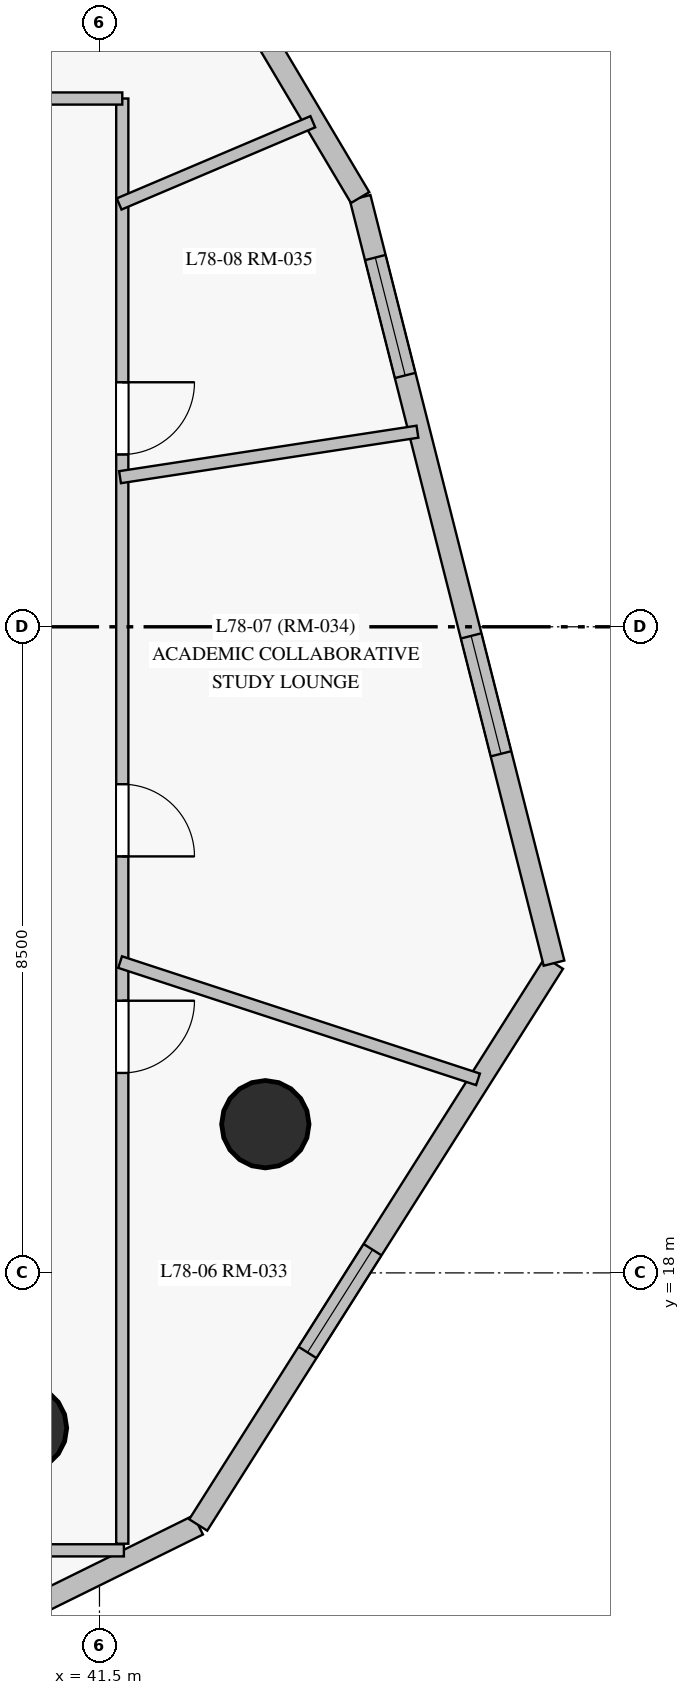
"""IFC4 building model, lengths in metres.
Left out: names, types, materials, properties, quantities, classifications, styles, units other than length and angle.
Written with IfcOpenShell. Run it as: python <this file> out.ifc"""

import sys

from ifc_helpers import new_model, si_unit, direction, frame, frame_2d, origin, origin_with_axes, origin_2d, place, context, subcontext, project, spatial, rectangle, circle, extrude, source, transform, mapped, element, fill, save


model = new_model("IFC4")
c1 = context("Model", 3, precision=1e-05, world=origin(), true_north=direction((0.0, 1.0)))
c2 = subcontext(c1, "Body", "Model", "MODEL_VIEW")
j1 = project(units=[si_unit("LENGTHUNIT", "METRE"), si_unit("PLANEANGLEUNIT", "RADIAN")], contexts=[c1])
p1 = place(None, origin())
s1 = spatial("IfcSite", under=j1, at=p1, CompositionType="ELEMENT")
p2 = place(p1, origin())
s2 = spatial("IfcBuilding", under=s1, at=p2, CompositionType="ELEMENT")
p3 = place(p2, frame((0.0, 0.0, 262.65)))
s3 = spatial("IfcBuildingStorey", under=s2, at=p3, CompositionType="ELEMENT", Elevation=262.65)
m1 = source(origin_with_axes(), c2, "Body", "SweptSolid", [
    extrude(circle(Radius=0.575, at=origin_2d()), origin(), (0.0, 0.0, 1.0), 3.05),
])
for number, where, z_axis, x_axis in (
    (1, (43.682, 19.956, 0.0), (0.0, 0.0, 1.0), (1.0, 0.0, 0.0)),
    (2, (40.494, 15.96, 0.0), (0.0, 0.0, 1.0), (1.0, 0.0, 0.0)),
):
    element("IfcColumn", number, at=place(p3, frame(where, z_axis=z_axis, x_axis=x_axis)), inside=s3, PredefinedType="COLUMN", context=c2, shape_type="MappedRepresentation", body=[
        mapped(m1, transform((0.0, 0.0, 0.0), scale=1.0)),
    ])
p4 = place(p3, frame((32.101, 9.405, 0.0), z_axis=(0.0, 0.0, 1.0), x_axis=(0.896764199355, 0.442508723931, 0.0)))
e3 = element("IfcWall", 3, at=p4, inside=s3, PredefinedType="SOLIDWALL", context=c2, shape_type="SweptSolid", body=[
    extrude(rectangle(XDim=11.93, YDim=0.28, at=frame_2d((5.965, 0.0))), origin(), (0.0, 0.0, 1.0), 2.85),
])
p5 = place(p4, frame((2.077, 0.0, 0.85)))
e4 = element("IfcOpeningElement", 4, at=p5, cuts=e3, PredefinedType="OPENING", context=c2, shape_type="SweptSolid", body=[
    extrude(rectangle(XDim=1.6, YDim=1.6, at=frame_2d((0.8, 0.8))), frame((0.0, 0.15, 0.0), z_axis=(0.0, -1.0, 0.0), x_axis=(1.0, 0.0, 0.0)), (0.0, 0.0, 1.0), 0.3),
])
p6 = place(p4, frame((7.072, 0.0, 0.85)))
e5 = element("IfcOpeningElement", 5, at=p6, cuts=e3, PredefinedType="OPENING", context=c2, shape_type="SweptSolid", body=[
    extrude(rectangle(XDim=1.6, YDim=1.6, at=frame_2d((0.8, 0.8))), frame((0.0, 0.15, 0.0), z_axis=(0.0, -1.0, 0.0), x_axis=(1.0, 0.0, 0.0)), (0.0, 0.0, 1.0), 0.3),
])
p7 = place(p3, frame((42.799, 14.684, 0.0), z_axis=(0.0, 0.0, 1.0), x_axis=(0.535008927274, 0.84484640482, 0.0)))
e6 = element("IfcWall", 6, at=p7, inside=s3, PredefinedType="SOLIDWALL", context=c2, shape_type="SweptSolid", body=[
    extrude(rectangle(XDim=8.749, YDim=0.28, at=frame_2d((4.375, 0.0))), origin(), (0.0, 0.0, 1.0), 2.85),
])
p8 = place(p7, frame((2.687, 0.0, 0.85)))
e7 = element("IfcOpeningElement", 7, at=p8, cuts=e6, PredefinedType="OPENING", context=c2, shape_type="SweptSolid", body=[
    extrude(rectangle(XDim=1.6, YDim=1.6, at=frame_2d((0.8, 0.8))), frame((0.0, 0.15, 0.0), z_axis=(0.0, -1.0, 0.0), x_axis=(1.0, 0.0, 0.0)), (0.0, 0.0, 1.0), 0.3),
])
p9 = place(p3, frame((47.48, 22.075, 0.0), z_axis=(0.0, 0.0, 1.0), x_axis=(-0.24553675392, 0.969387281985, 0.0)))
e8 = element("IfcWall", 8, at=p9, inside=s3, PredefinedType="SOLIDWALL", context=c2, shape_type="SweptSolid", body=[
    extrude(rectangle(XDim=10.39, YDim=0.28, at=frame_2d((5.195, 0.0))), origin(), (0.0, 0.0, 1.0), 2.85),
])
p10 = place(p9, frame((2.841, 0.0, 0.85)))
e9 = element("IfcOpeningElement", 9, at=p10, cuts=e8, PredefinedType="OPENING", context=c2, shape_type="SweptSolid", body=[
    extrude(rectangle(XDim=1.6, YDim=1.6, at=frame_2d((0.8, 0.8))), frame((0.0, 0.15, 0.0), z_axis=(0.0, -1.0, 0.0), x_axis=(1.0, 0.0, 0.0)), (0.0, 0.0, 1.0), 0.3),
])
p11 = place(p9, frame((7.976, 0.0, 0.85)))
e10 = element("IfcOpeningElement", 10, at=p11, cuts=e8, PredefinedType="OPENING", context=c2, shape_type="SweptSolid", body=[
    extrude(rectangle(XDim=1.6, YDim=1.6, at=frame_2d((0.8, 0.8))), frame((0.0, 0.15, 0.0), z_axis=(0.0, -1.0, 0.0), x_axis=(1.0, 0.0, 0.0)), (0.0, 0.0, 1.0), 0.3),
])
p12 = place(p3, frame((44.929, 32.147, 0.0), z_axis=(0.0, 0.0, 1.0), x_axis=(-0.510843219919, 0.859673894371, 0.0)))
e11 = element("IfcWall", 11, at=p12, inside=s3, PredefinedType="SOLIDWALL", context=c2, shape_type="SweptSolid", body=[
    extrude(rectangle(XDim=7.076, YDim=0.28, at=frame_2d((3.538, 0.0))), origin(), (0.0, 0.0, 1.0), 2.85),
])
p13 = place(p12, frame((3.299, 0.0, 0.85)))
e12 = element("IfcOpeningElement", 12, at=p13, cuts=e11, PredefinedType="OPENING", context=c2, shape_type="SweptSolid", body=[
    extrude(rectangle(XDim=1.6, YDim=1.6, at=frame_2d((0.8, 0.8))), frame((0.0, 0.15, 0.0), z_axis=(0.0, -1.0, 0.0), x_axis=(1.0, 0.0, 0.0)), (0.0, 0.0, 1.0), 0.3),
])
p14 = place(p3, frame((41.821, 14.35, 0.0), z_axis=(0.0, 0.0, 1.0), x_axis=(-1.0, 0.0, 0.0)))
e13 = element("IfcWall", 13, at=p14, inside=s3, PredefinedType="PARTITIONING", context=c2, shape_type="SweptSolid", body=[
    extrude(rectangle(XDim=25.071, YDim=0.16, at=frame_2d((12.536, 0.0))), origin(), (0.0, 0.0, 1.0), 2.3),
])
p15 = place(p14, frame((22.309, 0.0, 0.0)))
e14 = element("IfcOpeningElement", 14, at=p15, cuts=e13, PredefinedType="OPENING", context=c2, shape_type="SweptSolid", body=[
    extrude(rectangle(XDim=0.95, YDim=2.15, at=frame_2d((0.475, 1.075))), frame((0.0, 0.09, 0.0), z_axis=(0.0, -1.0, 0.0), x_axis=(1.0, 0.0, 0.0)), (0.0, 0.0, 1.0), 0.18),
])
p16 = place(p14, frame((15.665, 0.0, 0.0)))
e15 = element("IfcOpeningElement", 15, at=p16, cuts=e13, PredefinedType="OPENING", context=c2, shape_type="SweptSolid", body=[
    extrude(rectangle(XDim=0.95, YDim=2.15, at=frame_2d((0.475, 1.075))), frame((0.0, 0.09, 0.0), z_axis=(0.0, -1.0, 0.0), x_axis=(1.0, 0.0, 0.0)), (0.0, 0.0, 1.0), 0.18),
])
p17 = place(p14, frame((11.94, 0.0, 0.0)))
e16 = element("IfcOpeningElement", 16, at=p17, cuts=e13, PredefinedType="OPENING", context=c2, shape_type="SweptSolid", body=[
    extrude(rectangle(XDim=0.95, YDim=2.15, at=frame_2d((0.475, 1.075))), frame((0.0, 0.09, 0.0), z_axis=(0.0, -1.0, 0.0), x_axis=(1.0, 0.0, 0.0)), (0.0, 0.0, 1.0), 0.18),
])
p18 = place(p3, frame((41.8, 33.45, 0.0), z_axis=(0.0, 0.0, 1.0), x_axis=(0.0, -1.0, 0.0)))
e17 = element("IfcWall", 17, at=p18, inside=s3, PredefinedType="PARTITIONING", context=c2, shape_type="SweptSolid", body=[
    extrude(rectangle(XDim=19.013, YDim=0.16, at=frame_2d((9.506, 0.0))), origin(), (0.0, 0.0, 1.0), 2.3),
])
p19 = place(p18, frame((11.869, 0.0, 0.0)))
e18 = element("IfcOpeningElement", 18, at=p19, cuts=e17, PredefinedType="OPENING", context=c2, shape_type="SweptSolid", body=[
    extrude(rectangle(XDim=0.95, YDim=2.15, at=frame_2d((0.475, 1.075))), frame((0.0, 0.09, 0.0), z_axis=(0.0, -1.0, 0.0), x_axis=(1.0, 0.0, 0.0)), (0.0, 0.0, 1.0), 0.18),
])
p20 = place(p18, frame((9.021, 0.0, 0.0)))
e19 = element("IfcOpeningElement", 19, at=p20, cuts=e17, PredefinedType="OPENING", context=c2, shape_type="SweptSolid", body=[
    extrude(rectangle(XDim=0.95, YDim=2.15, at=frame_2d((0.475, 1.075))), frame((0.0, 0.09, 0.0), z_axis=(0.0, -1.0, 0.0), x_axis=(1.0, 0.0, 0.0)), (0.0, 0.0, 1.0), 0.18),
])
p21 = place(p18, frame((3.733, 0.0, 0.0)))
e20 = element("IfcOpeningElement", 20, at=p21, cuts=e17, PredefinedType="OPENING", context=c2, shape_type="SweptSolid", body=[
    extrude(rectangle(XDim=0.95, YDim=2.15, at=frame_2d((0.475, 1.075))), frame((0.0, 0.09, 0.0), z_axis=(0.0, -1.0, 0.0), x_axis=(1.0, 0.0, 0.0)), (0.0, 0.0, 1.0), 0.18),
])
p22 = place(p3, frame((41.771, 22.089, 0.0), z_axis=(0.0, 0.0, 1.0), x_axis=(0.950306514445, -0.311315802046, 0.0)))
e21 = element("IfcWall", 21, at=p22, inside=s3, PredefinedType="PARTITIONING", context=c2, shape_type="SweptSolid", body=[
    extrude(rectangle(XDim=4.955, YDim=0.16, at=frame_2d((2.478, 0.0))), origin(), (0.0, 0.0, 1.0), 2.85),
])
p23 = place(p3, frame((37.682, 33.45, 0.0), z_axis=(0.0, 0.0, 1.0), x_axis=(1.0, 0.0, 0.0)))
e22 = element("IfcWall", 22, at=p23, inside=s3, PredefinedType="PARTITIONING", context=c2, shape_type="SweptSolid", body=[
    extrude(rectangle(XDim=4.118, YDim=0.16, at=frame_2d((2.059, 0.0))), origin(), (0.0, 0.0, 1.0), 2.85),
])
p24 = place(p3, frame((41.77, 28.468, 0.0), z_axis=(0.0, 0.0, 1.0), x_axis=(0.988507491148, 0.151171888738, 0.0)))
e23 = element("IfcWall", 23, at=p24, inside=s3, PredefinedType="PARTITIONING", context=c2, shape_type="SweptSolid", body=[
    extrude(rectangle(XDim=3.958, YDim=0.16, at=frame_2d((1.979, 0.0))), origin(), (0.0, 0.0, 1.0), 2.85),
])
p25 = place(p3, frame((41.759, 32.063, 0.0), z_axis=(0.0, 0.0, 1.0), x_axis=(0.92051258251, 0.390712919471, 0.0)))
e24 = element("IfcWall", 24, at=p25, inside=s3, PredefinedType="PARTITIONING", context=c2, shape_type="SweptSolid", body=[
    extrude(rectangle(XDim=2.768, YDim=0.16, at=frame_2d((1.384, 0.0))), origin(), (0.0, 0.0, 1.0), 2.85),
])
m2 = source(origin_with_axes(), c2, "Body", "SweptSolid", [
    extrude(rectangle(XDim=1.6, YDim=1.6, at=frame_2d((0.8, 0.8))), frame((0.0, 0.03, 0.0), z_axis=(0.0, -1.0, 0.0), x_axis=(1.0, 0.0, 0.0)), (0.0, 0.0, 1.0), 0.06),
])
p26 = place(p8, origin())
e25 = element("IfcWindow", 25, at=p26, inside=s3, PartitioningType="SINGLE_PANEL", PredefinedType="WINDOW", context=c2, shape_type="MappedRepresentation", body=[
    mapped(m2, transform((0.0, 0.0, 0.0), scale=1.0)),
])
fill(e7, e25)
p27 = place(p10, origin())
e26 = element("IfcWindow", 26, at=p27, inside=s3, PartitioningType="SINGLE_PANEL", PredefinedType="WINDOW", context=c2, shape_type="MappedRepresentation", body=[
    mapped(m2, transform((0.0, 0.0, 0.0), scale=1.0)),
])
fill(e9, e26)
p28 = place(p11, origin())
e27 = element("IfcWindow", 27, at=p28, inside=s3, PartitioningType="SINGLE_PANEL", PredefinedType="WINDOW", context=c2, shape_type="MappedRepresentation", body=[
    mapped(m2, transform((0.0, 0.0, 0.0), scale=1.0)),
])
fill(e10, e27)
m3 = source(origin_with_axes(), c2, "Body", "SweptSolid", [
    extrude(rectangle(XDim=0.95, YDim=2.15, at=frame_2d((0.475, 1.075))), frame((0.0, 0.025, 0.0), z_axis=(0.0, -1.0, 0.0), x_axis=(1.0, 0.0, 0.0)), (0.0, 0.0, 1.0), 0.05),
])
p29 = place(p19, origin())
e28 = element("IfcDoor", 28, at=p29, inside=s3, OperationType="SINGLE_SWING_LEFT", PredefinedType="DOOR", context=c2, shape_type="MappedRepresentation", body=[
    mapped(m3, transform((0.0, 0.0, 0.0), scale=1.0)),
])
fill(e18, e28)
p30 = place(p20, origin())
e29 = element("IfcDoor", 29, at=p30, inside=s3, OperationType="SINGLE_SWING_RIGHT", PredefinedType="DOOR", context=c2, shape_type="MappedRepresentation", body=[
    mapped(m3, transform((0.0, 0.0, 0.0), scale=1.0)),
])
fill(e19, e29)
p31 = place(p21, origin())
e30 = element("IfcDoor", 30, at=p31, inside=s3, OperationType="SINGLE_SWING_LEFT", PredefinedType="DOOR", context=c2, shape_type="MappedRepresentation", body=[
    mapped(m3, transform((0.0, 0.0, 0.0), scale=1.0)),
])
fill(e20, e30)
save(model, sys.argv[1])
